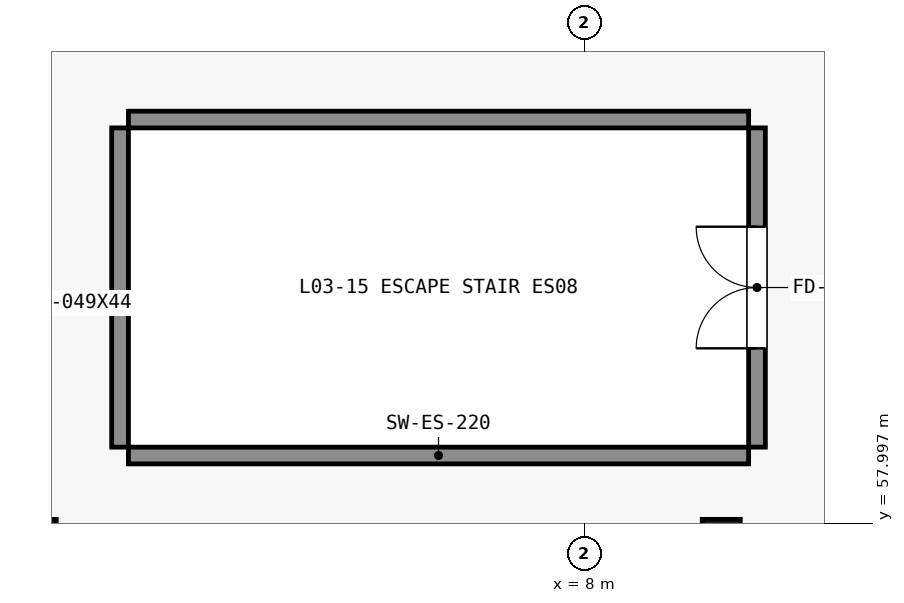
"""IFC4 building model, lengths in metres.
Left out: names, types, materials, properties, quantities, classifications, styles, units other than length and angle.
Written with IfcOpenShell. Run it as: python <this file> out.ifc"""

import sys

from ifc_helpers import new_model, si_unit, direction, frame, frame_2d, origin, origin_2d, place, context, subcontext, project, spatial, rectangle, extrude, element, fill, save


model = new_model("IFC4")
c1 = context("Model", 3, precision=1e-05, world=origin(), true_north=direction((0.0, 1.0)))
c2 = subcontext(c1, "Body", "Model", "MODEL_VIEW")
j1 = project(units=[si_unit("LENGTHUNIT", "METRE"), si_unit("PLANEANGLEUNIT", "RADIAN")], contexts=[c1])
p1 = place(None, origin())
s1 = spatial("IfcSite", under=j1, at=p1, CompositionType="ELEMENT")
p2 = place(p1, origin())
s2 = spatial("IfcBuilding", under=s1, at=p2, CompositionType="ELEMENT")
p3 = place(p2, frame((0.0, 0.0, 16.2)))
s3 = spatial("IfcBuildingStorey", under=s2, at=p3, CompositionType="ELEMENT", Elevation=16.2)
for number, where, z_axis, x_axis in (
    (1, (0.8, 57.8, 0.0), (0.0, 0.0, 1.0), (1.0, 0.0, 0.0)),
    (2, (9.8, 57.8, 0.0), (0.0, 0.0, 1.0), (1.0, 0.0, 0.0)),
):
    element("IfcColumn", number, at=place(p3, frame(where, z_axis=z_axis, x_axis=x_axis)), inside=s3, PredefinedType="COLUMN", context=c2, shape_type="SweptSolid", body=[
        extrude(rectangle(XDim=0.5, YDim=0.5, at=origin_2d()), origin(), (0.0, 0.0, 1.0), 4.44),
    ])
for number, where, z_axis, x_axis in (
    (3, (2.0, 58.89, 0.0), (0.0, 0.0, 1.0), (1.0, 0.0, 0.0)),
    (4, (2.0, 63.31, 0.0), (0.0, 0.0, 1.0), (1.0, 0.0, 0.0)),
):
    element("IfcWall", number, at=place(p3, frame(where, z_axis=z_axis, x_axis=x_axis)), inside=s3, PredefinedType="SHEAR", context=c2, shape_type="SweptSolid", body=[
        extrude(rectangle(XDim=8.16, YDim=0.22, at=frame_2d((4.08, 0.0))), origin(), (0.0, 0.0, 1.0), 4.44),
    ])
p4 = place(p3, frame((1.89, 59.0, 0.0), z_axis=(0.0, 0.0, 1.0), x_axis=(0.0, 1.0, 0.0)))
e5 = element("IfcWall", 5, at=p4, inside=s3, PredefinedType="SHEAR", context=c2, shape_type="SweptSolid", body=[
    extrude(rectangle(XDim=4.2, YDim=0.22, at=frame_2d((2.1, 0.0))), origin(), (0.0, 0.0, 1.0), 4.44),
])
p5 = place(p3, frame((10.27, 59.0, 0.0), z_axis=(0.0, 0.0, 1.0), x_axis=(0.0, 1.0, 0.0)))
e6 = element("IfcWall", 6, at=p5, inside=s3, PredefinedType="SHEAR", context=c2, shape_type="SweptSolid", body=[
    extrude(rectangle(XDim=4.2, YDim=0.22, at=frame_2d((2.1, 0.0))), origin(), (0.0, 0.0, 1.0), 4.44),
])
p6 = place(p5, frame((1.3, 0.0, 0.0)))
e7 = element("IfcOpeningElement", 7, at=p6, cuts=e6, PredefinedType="OPENING", context=c2, shape_type="SweptSolid", body=[
    extrude(rectangle(XDim=1.6, YDim=2.2, at=frame_2d((0.8, 1.1))), frame((0.0, 0.12, 0.0), z_axis=(0.0, -1.0, 0.0), x_axis=(1.0, 0.0, 0.0)), (0.0, 0.0, 1.0), 0.24),
])
p7 = place(p6, origin())
e8 = element("IfcDoor", 8, at=p7, inside=s3, OperationType="DOUBLE_DOOR_SINGLE_SWING", PredefinedType="DOOR", context=c2, shape_type="SweptSolid", body=[
    extrude(rectangle(XDim=1.6, YDim=2.2, at=frame_2d((0.8, 1.1))), frame((0.0, 0.025, 0.0), z_axis=(0.0, -1.0, 0.0), x_axis=(1.0, 0.0, 0.0)), (0.0, 0.0, 1.0), 0.05),
])
fill(e7, e8)
save(model, sys.argv[1])
